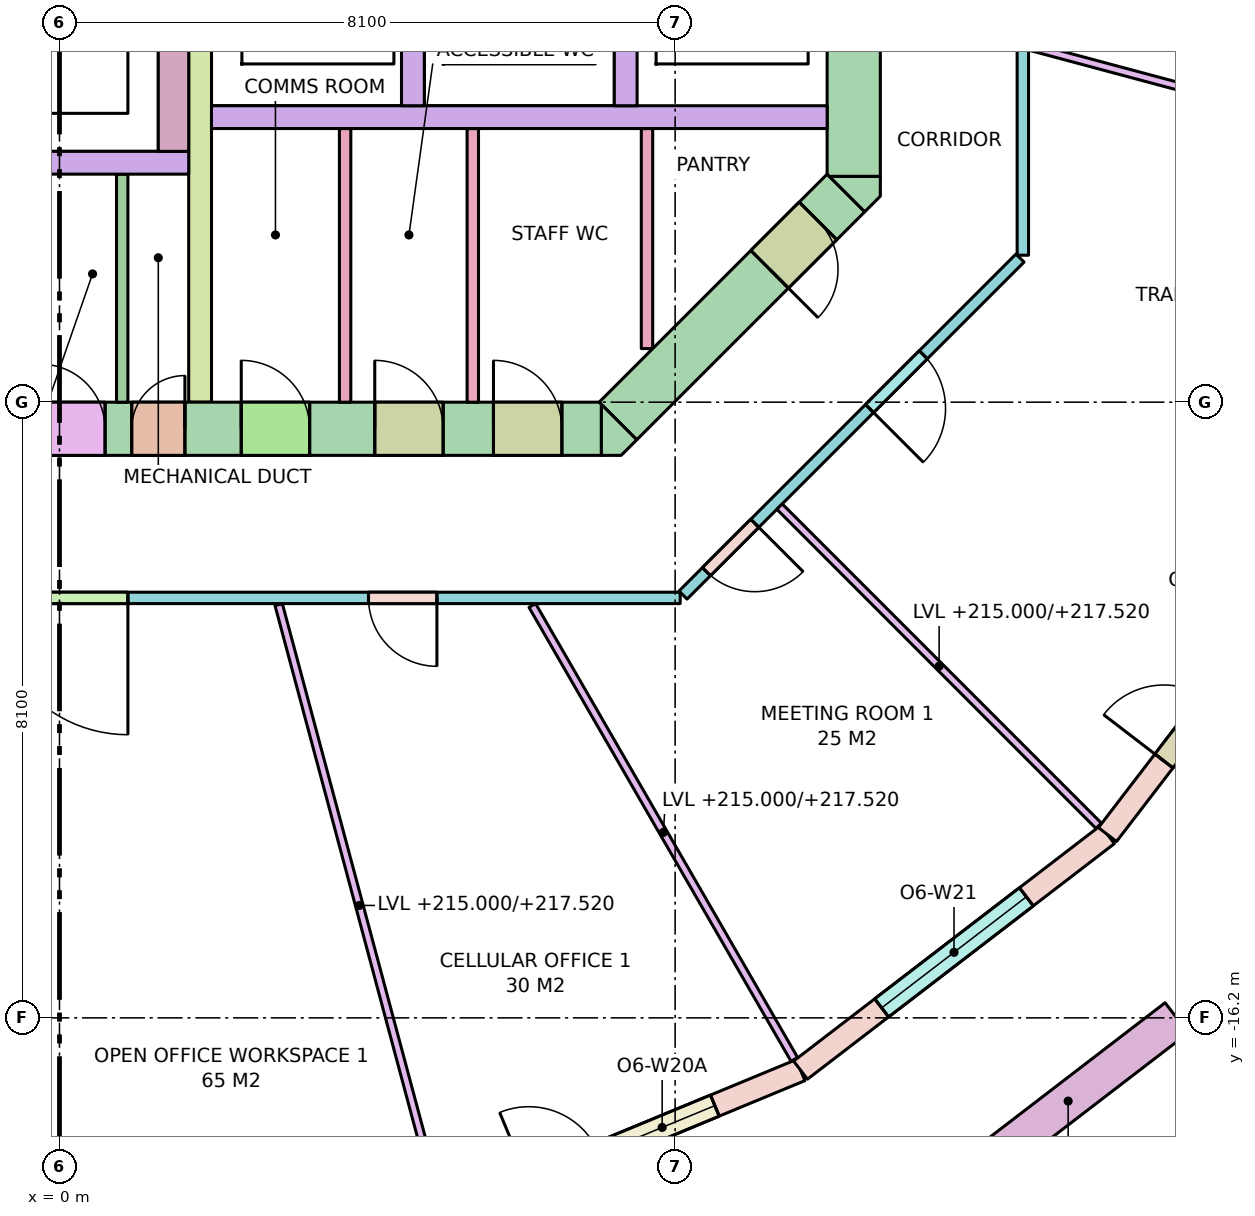
"""IFC4 building model, lengths in metres.
Left out: names, types, materials, properties, quantities, classifications, styles, units other than length and angle.
Written with IfcOpenShell. Run it as: python <this file> out.ifc"""

import sys

from ifc_helpers import new_model, si_unit, direction, frame, frame_2d, origin, place, context, subcontext, project, spatial, polyline, rectangle, outline, extrude, element, fill, save


model = new_model("IFC4")
c1 = context("Model", 3, precision=1e-05, world=origin(), true_north=direction((0.0, 1.0)))
c2 = subcontext(c1, "Body", "Model", "MODEL_VIEW")
j1 = project(units=[si_unit("LENGTHUNIT", "METRE"), si_unit("PLANEANGLEUNIT", "RADIAN")], contexts=[c1])
p1 = place(None, origin())
s1 = spatial("IfcSite", under=j1, at=p1, CompositionType="ELEMENT")
p2 = place(p1, origin())
s2 = spatial("IfcBuilding", under=s1, at=p2, CompositionType="ELEMENT")
p3 = place(p2, frame((0.0, 0.0, 215.0)))
s3 = spatial("IfcBuildingStorey", under=s2, at=p3, CompositionType="ELEMENT", Elevation=215.0)
p4 = place(p3, frame((-7.13, -8.45, -0.28), z_axis=(0.0, 0.0, 1.0), x_axis=(1.0, 0.0, 0.0)))
e1 = element("IfcWall", 1, at=p4, inside=s3, PredefinedType="SHEAR", context=c2, shape_type="SweptSolid", body=[
    extrude(rectangle(XDim=14.26, YDim=0.7, at=frame_2d((7.13, 0.0))), origin(), (0.0, 0.0, 1.0), 3.7),
])
p5 = place(p4, frame((8.08, 0.0, 0.28)))
e2 = element("IfcOpeningElement", 2, at=p5, cuts=e1, PredefinedType="OPENING", context=c2, shape_type="SweptSolid", body=[
    extrude(rectangle(XDim=0.7, YDim=2.1, at=frame_2d((0.35, 1.05))), frame((0.0, 0.36, 0.0), z_axis=(0.0, -1.0, 0.0), x_axis=(1.0, 0.0, 0.0)), (0.0, 0.0, 1.0), 0.72),
])
p6 = place(p4, frame((5.58, 0.0, 0.28)))
e3 = element("IfcOpeningElement", 3, at=p6, cuts=e1, PredefinedType="OPENING", context=c2, shape_type="SweptSolid", body=[
    extrude(rectangle(XDim=0.85, YDim=2.1, at=frame_2d((0.425, 1.05))), frame((0.0, 0.36, 0.0), z_axis=(0.0, -1.0, 0.0), x_axis=(1.0, 0.0, 0.0)), (0.0, 0.0, 1.0), 0.72),
])
p7 = place(p4, frame((6.88, 0.0, 0.28)))
e4 = element("IfcOpeningElement", 4, at=p7, cuts=e1, PredefinedType="OPENING", context=c2, shape_type="SweptSolid", body=[
    extrude(rectangle(XDim=0.85, YDim=2.1, at=frame_2d((0.425, 1.05))), frame((0.0, 0.36, 0.0), z_axis=(0.0, -1.0, 0.0), x_axis=(1.0, 0.0, 0.0)), (0.0, 0.0, 1.0), 0.72),
])
p8 = place(p4, frame((9.521, 0.0, 0.28)))
e5 = element("IfcOpeningElement", 5, at=p8, cuts=e1, PredefinedType="OPENING", context=c2, shape_type="SweptSolid", body=[
    extrude(rectangle(XDim=0.9, YDim=2.1, at=frame_2d((0.45, 1.05))), frame((0.0, 0.36, 0.0), z_axis=(0.0, -1.0, 0.0), x_axis=(1.0, 0.0, 0.0)), (0.0, 0.0, 1.0), 0.72),
])
p9 = place(p4, frame((11.278, 0.0, 0.28)))
e6 = element("IfcOpeningElement", 6, at=p9, cuts=e1, PredefinedType="OPENING", context=c2, shape_type="SweptSolid", body=[
    extrude(rectangle(XDim=0.9, YDim=2.1, at=frame_2d((0.45, 1.05))), frame((0.0, 0.36, 0.0), z_axis=(0.0, -1.0, 0.0), x_axis=(1.0, 0.0, 0.0)), (0.0, 0.0, 1.0), 0.72),
])
p10 = place(p4, frame((12.84, 0.0, 0.28)))
e7 = element("IfcOpeningElement", 7, at=p10, cuts=e1, PredefinedType="OPENING", context=c2, shape_type="SweptSolid", body=[
    extrude(rectangle(XDim=0.9, YDim=2.1, at=frame_2d((0.45, 1.05))), frame((0.0, 0.36, 0.0), z_axis=(0.0, -1.0, 0.0), x_axis=(1.0, 0.0, 0.0)), (0.0, 0.0, 1.0), 0.72),
])
p11 = place(p3, frame((10.45, -5.13, -0.28), z_axis=(0.0, 0.0, 1.0), x_axis=(0.0, 1.0, 0.0)))
e8 = element("IfcWall", 8, at=p11, inside=s3, PredefinedType="SHEAR", context=c2, shape_type="SweptSolid", body=[
    extrude(rectangle(XDim=10.26, YDim=0.7, at=frame_2d((5.13, 0.0))), origin(), (0.0, 0.0, 1.0), 3.7),
])
p12 = place(p11, frame((4.13, 0.0, 0.28)))
e9 = element("IfcOpeningElement", 9, at=p12, cuts=e8, PredefinedType="OPENING", context=c2, shape_type="SweptSolid", body=[
    extrude(rectangle(XDim=2.0, YDim=2.1, at=frame_2d((1.0, 1.05))), frame((0.0, 0.36, 0.0), z_axis=(0.0, -1.0, 0.0), x_axis=(1.0, 0.0, 0.0)), (0.0, 0.0, 1.0), 0.72),
])
p13 = place(p3, frame((10.347, -5.347, -0.28), z_axis=(0.0, 0.0, 1.0), x_axis=(-0.707106781187, -0.707106781187, 0.0)))
e10 = element("IfcWall", 10, at=p13, inside=s3, PredefinedType="SHEAR", context=c2, shape_type="SweptSolid", body=[
    extrude(rectangle(XDim=4.243, YDim=0.7, at=frame_2d((2.121, 0.0))), origin(), (0.0, 0.0, 1.0), 3.7),
])
p14 = place(p13, frame((0.52, 0.0, 0.28)))
e11 = element("IfcOpeningElement", 11, at=p14, cuts=e10, PredefinedType="OPENING", context=c2, shape_type="SweptSolid", body=[
    extrude(rectangle(XDim=0.9, YDim=2.1, at=frame_2d((0.45, 1.05))), frame((0.0, 0.36, 0.0), z_axis=(0.0, -1.0, 0.0), x_axis=(1.0, 0.0, 0.0)), (0.0, 0.0, 1.0), 0.72),
])
p15 = place(p3, frame((0.0, 0.0, -0.28)))
e12 = element("IfcWall", 12, at=p15, inside=s3, PredefinedType="SHEAR", context=c2, shape_type="SweptSolid", body=[
    extrude(outline(polyline([(7.39, -8.8), (7.13, -8.8), (7.13, -8.8), (7.13, -8.13), (7.595, -8.595), (7.595, -8.595), (7.595, -8.595), (7.39, -8.8)])), origin(), (0.0, 0.0, 1.0), 3.7),
])
p16 = place(p3, frame((0.0, 0.0, -0.28)))
e13 = element("IfcWall", 13, at=p16, inside=s3, PredefinedType="SHEAR", context=c2, shape_type="SweptSolid", body=[
    extrude(outline(polyline([(10.8, -5.39), (10.595, -5.595), (10.595, -5.595), (10.595, -5.595), (10.13, -5.13), (10.8, -5.13), (10.8, -5.13), (10.8, -5.39)])), origin(), (0.0, 0.0, 1.0), 3.7),
])
p17 = place(p3, frame((2.0, -4.35, 0.0), z_axis=(0.0, 0.0, 1.0), x_axis=(1.0, 0.0, 0.0)))
e14 = element("IfcWall", 14, at=p17, inside=s3, PredefinedType="SOLIDWALL", context=c2, shape_type="SweptSolid", body=[
    extrude(rectangle(XDim=8.1, YDim=0.3, at=frame_2d((4.05, 0.0))), origin(), (0.0, 0.0, 1.0), 3.42),
])
for number, where, z_axis, x_axis in (
    (15, (4.65, -4.2, 0.0), (0.0, 0.0, 1.0), (0.0, 1.0, 0.0)),
    (16, (7.45, -4.2, 0.0), (0.0, 0.0, 1.0), (0.0, 1.0, 0.0)),
):
    element("IfcWall", number, at=place(p3, frame(where, z_axis=z_axis, x_axis=x_axis)), inside=s3, PredefinedType="SOLIDWALL", context=c2, shape_type="SweptSolid", body=[
        extrude(rectangle(XDim=2.4, YDim=0.3, at=frame_2d((1.2, 0.0))), origin(), (0.0, 0.0, 1.0), 3.42),
    ])
p18 = place(p3, frame((1.85, -8.1, 0.0), z_axis=(0.0, 0.0, 1.0), x_axis=(0.0, 1.0, 0.0)))
e17 = element("IfcWall", 17, at=p18, inside=s3, PredefinedType="SHEAR", context=c2, shape_type="SweptSolid", body=[
    extrude(rectangle(XDim=6.6, YDim=0.3, at=frame_2d((3.3, 0.0))), origin(), (0.0, 0.0, 1.0), 3.42),
])
p19 = place(p3, frame((1.5, -4.8, 0.0), z_axis=(0.0, 0.0, 1.0), x_axis=(0.0, 1.0, 0.0)))
e18 = element("IfcWall", 18, at=p19, inside=s3, PredefinedType="SOLIDWALL", context=c2, shape_type="SweptSolid", body=[
    extrude(rectangle(XDim=3.0, YDim=0.4, at=frame_2d((1.5, 0.0))), origin(), (0.0, 0.0, 1.0), 3.42),
])
p20 = place(p3, frame((-1.7, -4.95, 0.0), z_axis=(0.0, 0.0, 1.0), x_axis=(1.0, 0.0, 0.0)))
e19 = element("IfcWall", 19, at=p20, inside=s3, PredefinedType="SOLIDWALL", context=c2, shape_type="SweptSolid", body=[
    extrude(rectangle(XDim=3.4, YDim=0.3, at=frame_2d((1.7, 0.0))), origin(), (0.0, 0.0, 1.0), 3.42),
])
p21 = place(p3, frame((5.047, -18.836, 0.0), z_axis=(0.0, 0.0, 1.0), x_axis=(0.923862504675, 0.382724538613, 0.0)))
e20 = element("IfcWall", 20, at=p21, inside=s3, PredefinedType="STANDARD", context=c2, shape_type="SweptSolid", body=[
    extrude(rectangle(XDim=5.091, YDim=0.3, at=frame_2d((2.545, 0.0))), origin(), (0.0, 0.0, 1.0), 3.42),
])
p22 = place(p21, frame((1.22, 0.0, 0.0)))
e21 = element("IfcOpeningElement", 21, at=p22, cuts=e20, PredefinedType="OPENING", context=c2, shape_type="SweptSolid", body=[
    extrude(rectangle(XDim=1.0, YDim=2.4, at=frame_2d((0.5, 1.2))), frame((0.0, 0.16, 0.0), z_axis=(0.0, -1.0, 0.0), x_axis=(1.0, 0.0, 0.0)), (0.0, 0.0, 1.0), 0.32),
])
p23 = place(p21, frame((2.37, 0.0, 0.8)))
e22 = element("IfcOpeningElement", 22, at=p23, cuts=e20, PredefinedType="OPENING", context=c2, shape_type="SweptSolid", body=[
    extrude(rectangle(XDim=1.5, YDim=2.4, at=frame_2d((0.75, 1.2))), frame((0.0, 0.16, 0.0), z_axis=(0.0, -1.0, 0.0), x_axis=(1.0, 0.0, 0.0)), (0.0, 0.0, 1.0), 0.32),
])
p24 = place(p3, frame((9.75, -16.887, 0.0), z_axis=(0.0, 0.0, 1.0), x_axis=(0.79335619014, 0.608757714995, 0.0)))
e23 = element("IfcWall", 23, at=p24, inside=s3, PredefinedType="STANDARD", context=c2, shape_type="SweptSolid", body=[
    extrude(rectangle(XDim=5.091, YDim=0.3, at=frame_2d((2.545, 0.0))), origin(), (0.0, 0.0, 1.0), 3.42),
])
p25 = place(p24, frame((1.345, 0.0, 0.8)))
e24 = element("IfcOpeningElement", 24, at=p25, cuts=e23, PredefinedType="OPENING", context=c2, shape_type="SweptSolid", body=[
    extrude(rectangle(XDim=2.4, YDim=2.4, at=frame_2d((1.2, 1.2))), frame((0.0, 0.16, 0.0), z_axis=(0.0, -1.0, 0.0), x_axis=(1.0, 0.0, 0.0)), (0.0, 0.0, 1.0), 0.32),
])
p26 = place(p3, frame((13.789, -13.789, 0.0), z_axis=(0.0, 0.0, 1.0), x_axis=(0.608757714995, 0.79335619014, 0.0)))
e25 = element("IfcWall", 25, at=p26, inside=s3, PredefinedType="STANDARD", context=c2, shape_type="SweptSolid", body=[
    extrude(rectangle(XDim=5.091, YDim=0.3, at=frame_2d((2.545, 0.0))), origin(), (0.0, 0.0, 1.0), 3.42),
])
p27 = place(p26, frame((1.22, 0.0, 0.0)))
e26 = element("IfcOpeningElement", 26, at=p27, cuts=e25, PredefinedType="OPENING", context=c2, shape_type="SweptSolid", body=[
    extrude(rectangle(XDim=1.0, YDim=2.4, at=frame_2d((0.5, 1.2))), frame((0.0, 0.16, 0.0), z_axis=(0.0, -1.0, 0.0), x_axis=(1.0, 0.0, 0.0)), (0.0, 0.0, 1.0), 0.32),
])
p28 = place(p26, frame((2.37, 0.0, 0.8)))
e27 = element("IfcOpeningElement", 27, at=p28, cuts=e25, PredefinedType="OPENING", context=c2, shape_type="SweptSolid", body=[
    extrude(rectangle(XDim=1.5, YDim=2.4, at=frame_2d((0.75, 1.2))), frame((0.0, 0.16, 0.0), z_axis=(0.0, -1.0, 0.0), x_axis=(1.0, 0.0, 0.0)), (0.0, 0.0, 1.0), 0.32),
])
p29 = place(p3, frame((11.843, -18.391, 0.0), z_axis=(0.0, 0.0, 1.0), x_axis=(0.793326845617, 0.608795955984, 0.0)))
e28 = element("IfcWall", 28, at=p29, inside=s3, PredefinedType="PARAPET", context=c2, shape_type="SweptSolid", body=[
    extrude(rectangle(XDim=3.6, YDim=0.5, at=frame_2d((1.8, 0.0))), origin(), (0.0, 0.0, 1.0), 0.9),
])
p30 = place(p3, frame((0.825, -8.1, 0.0), z_axis=(0.0, 0.0, 1.0), x_axis=(0.0, 1.0, 0.0)))
e29 = element("IfcWall", 29, at=p30, inside=s3, PredefinedType="PARTITIONING", context=c2, shape_type="SweptSolid", body=[
    extrude(rectangle(XDim=3.0, YDim=0.15, at=frame_2d((1.5, 0.0))), origin(), (0.0, 0.0, 1.0), 3.42),
])
for number, where, z_axis, x_axis in (
    (30, (3.758, -8.1, 0.0), (0.0, 0.0, 1.0), (0.0, 1.0, 0.0)),
    (31, (5.438, -8.1, 0.0), (0.0, 0.0, 1.0), (0.0, 1.0, 0.0)),
):
    element("IfcWall", number, at=place(p3, frame(where, z_axis=z_axis, x_axis=x_axis)), inside=s3, PredefinedType="PARTITIONING", context=c2, shape_type="SweptSolid", body=[
        extrude(rectangle(XDim=3.6, YDim=0.15, at=frame_2d((1.8, 0.0))), origin(), (0.0, 0.0, 1.0), 3.42),
    ])
p31 = place(p3, frame((7.73, -7.395, 0.0), z_axis=(0.0, 0.0, 1.0), x_axis=(0.0, 1.0, 0.0)))
e32 = element("IfcWall", 32, at=p31, inside=s3, PredefinedType="PARTITIONING", context=c2, shape_type="SweptSolid", body=[
    extrude(rectangle(XDim=2.895, YDim=0.15, at=frame_2d((1.448, 0.0))), origin(), (0.0, 0.0, 1.0), 3.42),
])
p32 = place(p3, frame((12.638, -6.204, 0.0), z_axis=(0.0, 0.0, 1.0), x_axis=(-0.707106781187, -0.707106781187, 0.0)))
e33 = element("IfcWall", 33, at=p32, inside=s3, PredefinedType="PARTITIONING", context=c2, shape_type="SweptSolid", body=[
    extrude(rectangle(XDim=6.271, YDim=0.15, at=frame_2d((3.135, 0.0))), origin(), (0.0, 0.0, 1.0), 2.52),
])
p33 = place(p32, frame((4.935, 0.0, 0.0)))
e34 = element("IfcOpeningElement", 34, at=p33, cuts=e33, PredefinedType="OPENING", context=c2, shape_type="SweptSolid", body=[
    extrude(rectangle(XDim=0.9, YDim=2.1, at=frame_2d((0.45, 1.05))), frame((0.0, 0.085, 0.0), z_axis=(0.0, -1.0, 0.0), x_axis=(1.0, 0.0, 0.0)), (0.0, 0.0, 1.0), 0.17),
])
p34 = place(p32, frame((1.8, 0.0, 0.0)))
e35 = element("IfcOpeningElement", 35, at=p34, cuts=e33, PredefinedType="OPENING", context=c2, shape_type="SweptSolid", body=[
    extrude(rectangle(XDim=1.0, YDim=2.1, at=frame_2d((0.5, 1.05))), frame((0.0, 0.085, 0.0), z_axis=(0.0, -1.0, 0.0), x_axis=(1.0, 0.0, 0.0)), (0.0, 0.0, 1.0), 0.17),
])
p35 = place(p3, frame((8.167, -10.675, 0.0), z_axis=(0.0, 0.0, 1.0), x_axis=(-1.0, 0.0, 0.0)))
e36 = element("IfcWall", 36, at=p35, inside=s3, PredefinedType="PARTITIONING", context=c2, shape_type="SweptSolid", body=[
    extrude(rectangle(XDim=14.33, YDim=0.15, at=frame_2d((7.165, 0.0))), origin(), (0.0, 0.0, 1.0), 2.52),
])
p36 = place(p35, frame((7.267, 0.0, 0.0)))
e37 = element("IfcOpeningElement", 37, at=p36, cuts=e36, PredefinedType="OPENING", context=c2, shape_type="SweptSolid", body=[
    extrude(rectangle(XDim=1.8, YDim=2.1, at=frame_2d((0.9, 1.05))), frame((0.0, 0.085, 0.0), z_axis=(0.0, -1.0, 0.0), x_axis=(1.0, 0.0, 0.0)), (0.0, 0.0, 1.0), 0.17),
])
p37 = place(p35, frame((3.201, 0.0, 0.0)))
e38 = element("IfcOpeningElement", 38, at=p37, cuts=e36, PredefinedType="OPENING", context=c2, shape_type="SweptSolid", body=[
    extrude(rectangle(XDim=0.9, YDim=2.1, at=frame_2d((0.45, 1.05))), frame((0.0, 0.085, 0.0), z_axis=(0.0, -1.0, 0.0), x_axis=(1.0, 0.0, 0.0)), (0.0, 0.0, 1.0), 0.17),
])
p38 = place(p35, frame((11.753, 0.0, 0.0)))
e39 = element("IfcOpeningElement", 39, at=p38, cuts=e36, PredefinedType="OPENING", context=c2, shape_type="SweptSolid", body=[
    extrude(rectangle(XDim=1.8, YDim=2.1, at=frame_2d((0.9, 1.05))), frame((0.0, 0.085, 0.0), z_axis=(0.0, -1.0, 0.0), x_axis=(1.0, 0.0, 0.0)), (0.0, 0.0, 1.0), 0.17),
])
p39 = place(p3, frame((12.675, 6.167, 0.0), z_axis=(0.0, 0.0, 1.0), x_axis=(0.0, -1.0, 0.0)))
e40 = element("IfcWall", 40, at=p39, inside=s3, PredefinedType="PARTITIONING", context=c2, shape_type="SweptSolid", body=[
    extrude(rectangle(XDim=12.333, YDim=0.15, at=frame_2d((6.167, 0.0))), origin(), (0.0, 0.0, 1.0), 2.52),
])
p40 = place(p39, frame((7.416, 0.0, 0.0)))
e41 = element("IfcOpeningElement", 41, at=p40, cuts=e40, PredefinedType="OPENING", context=c2, shape_type="SweptSolid", body=[
    extrude(rectangle(XDim=0.9, YDim=2.1, at=frame_2d((0.45, 1.05))), frame((0.0, 0.085, 0.0), z_axis=(0.0, -1.0, 0.0), x_axis=(1.0, 0.0, 0.0)), (0.0, 0.0, 1.0), 0.17),
])
p41 = place(p3, frame((2.884, -10.764, 0.0), z_axis=(0.0, 0.0, 1.0), x_axis=(0.258818011497, -0.965926103242, 0.0)))
e42 = element("IfcWall", 42, at=p41, inside=s3, PredefinedType="PARTITIONING", context=c2, shape_type="SweptSolid", body=[
    extrude(rectangle(XDim=8.192, YDim=0.1, at=frame_2d((4.096, 0.0))), origin(), (0.0, 0.0, 1.0), 2.52),
])
p42 = place(p3, frame((6.221, -10.775, 0.0), z_axis=(0.0, 0.0, 1.0), x_axis=(0.500015661236, -0.866016361577, 0.0)))
e43 = element("IfcWall", 43, at=p42, inside=s3, PredefinedType="PARTITIONING", context=c2, shape_type="SweptSolid", body=[
    extrude(rectangle(XDim=6.895, YDim=0.1, at=frame_2d((3.448, 0.0))), origin(), (0.0, 0.0, 1.0), 2.52),
])
p43 = place(p3, frame((9.474, -9.474, 0.0), z_axis=(0.0, 0.0, 1.0), x_axis=(0.707106781187, -0.707106781187, 0.0)))
e44 = element("IfcWall", 44, at=p43, inside=s3, PredefinedType="PARTITIONING", context=c2, shape_type="SweptSolid", body=[
    extrude(rectangle(XDim=5.938, YDim=0.1, at=frame_2d((2.969, 0.0))), origin(), (0.0, 0.0, 1.0), 2.52),
])
p44 = place(p3, frame((12.764, -3.42, 0.0), z_axis=(0.0, 0.0, 1.0), x_axis=(0.965925800266, -0.258819142221, 0.0)))
e45 = element("IfcWall", 45, at=p44, inside=s3, PredefinedType="PARTITIONING", context=c2, shape_type="SweptSolid", body=[
    extrude(rectangle(XDim=6.122, YDim=0.1, at=frame_2d((3.061, 0.0))), origin(), (0.0, 0.0, 1.0), 2.52),
])
p45 = place(p23, origin())
e46 = element("IfcWindow", 46, at=p45, inside=s3, PartitioningType="SINGLE_PANEL", PredefinedType="WINDOW", context=c2, shape_type="SweptSolid", body=[
    extrude(rectangle(XDim=1.5, YDim=2.4, at=frame_2d((0.75, 1.2))), frame((0.0, 0.03, 0.0), z_axis=(0.0, -1.0, 0.0), x_axis=(1.0, 0.0, 0.0)), (0.0, 0.0, 1.0), 0.06),
])
fill(e22, e46)
p46 = place(p25, origin())
e47 = element("IfcWindow", 47, at=p46, inside=s3, PartitioningType="SINGLE_PANEL", PredefinedType="WINDOW", context=c2, shape_type="SweptSolid", body=[
    extrude(rectangle(XDim=2.4, YDim=2.4, at=frame_2d((1.2, 1.2))), frame((0.0, 0.03, 0.0), z_axis=(0.0, -1.0, 0.0), x_axis=(1.0, 0.0, 0.0)), (0.0, 0.0, 1.0), 0.06),
])
fill(e24, e47)
p47 = place(p27, origin())
e48 = element("IfcDoor", 48, at=p47, inside=s3, OperationType="SINGLE_SWING_LEFT", PredefinedType="DOOR", context=c2, shape_type="SweptSolid", body=[
    extrude(rectangle(XDim=1.0, YDim=2.4, at=frame_2d((0.5, 1.2))), frame((0.0, 0.025, 0.0), z_axis=(0.0, -1.0, 0.0), x_axis=(1.0, 0.0, 0.0)), (0.0, 0.0, 1.0), 0.05),
])
fill(e26, e48)
p48 = place(p5, origin())
e49 = element("IfcDoor", 49, at=p48, inside=s3, OperationType="SINGLE_SWING_RIGHT", PredefinedType="DOOR", context=c2, shape_type="SweptSolid", body=[
    extrude(rectangle(XDim=0.7, YDim=2.1, at=frame_2d((0.35, 1.05))), frame((0.0, 0.025, 0.0), z_axis=(0.0, -1.0, 0.0), x_axis=(1.0, 0.0, 0.0)), (0.0, 0.0, 1.0), 0.05),
])
fill(e2, e49)
p49 = place(p7, origin())
e50 = element("IfcDoor", 50, at=p49, inside=s3, OperationType="SINGLE_SWING_LEFT", PredefinedType="DOOR", context=c2, shape_type="SweptSolid", body=[
    extrude(rectangle(XDim=0.85, YDim=2.1, at=frame_2d((0.425, 1.05))), frame((0.0, 0.025, 0.0), z_axis=(0.0, -1.0, 0.0), x_axis=(1.0, 0.0, 0.0)), (0.0, 0.0, 1.0), 0.05),
])
fill(e4, e50)
p50 = place(p8, origin())
e51 = element("IfcDoor", 51, at=p50, inside=s3, OperationType="SINGLE_SWING_LEFT", PredefinedType="DOOR", context=c2, shape_type="SweptSolid", body=[
    extrude(rectangle(XDim=0.9, YDim=2.1, at=frame_2d((0.45, 1.05))), frame((0.0, 0.025, 0.0), z_axis=(0.0, -1.0, 0.0), x_axis=(1.0, 0.0, 0.0)), (0.0, 0.0, 1.0), 0.05),
])
fill(e5, e51)
p51 = place(p9, origin())
e52 = element("IfcDoor", 52, at=p51, inside=s3, OperationType="SINGLE_SWING_LEFT", PredefinedType="DOOR", context=c2, shape_type="SweptSolid", body=[
    extrude(rectangle(XDim=0.9, YDim=2.1, at=frame_2d((0.45, 1.05))), frame((0.0, 0.025, 0.0), z_axis=(0.0, -1.0, 0.0), x_axis=(1.0, 0.0, 0.0)), (0.0, 0.0, 1.0), 0.05),
])
fill(e6, e52)
p52 = place(p10, origin())
e53 = element("IfcDoor", 53, at=p52, inside=s3, OperationType="SINGLE_SWING_LEFT", PredefinedType="DOOR", context=c2, shape_type="SweptSolid", body=[
    extrude(rectangle(XDim=0.9, YDim=2.1, at=frame_2d((0.45, 1.05))), frame((0.0, 0.025, 0.0), z_axis=(0.0, -1.0, 0.0), x_axis=(1.0, 0.0, 0.0)), (0.0, 0.0, 1.0), 0.05),
])
fill(e7, e53)
p53 = place(p14, origin())
e54 = element("IfcDoor", 54, at=p53, inside=s3, OperationType="SINGLE_SWING_RIGHT", PredefinedType="DOOR", context=c2, shape_type="SweptSolid", body=[
    extrude(rectangle(XDim=0.9, YDim=2.1, at=frame_2d((0.45, 1.05))), frame((0.0, 0.025, 0.0), z_axis=(0.0, -1.0, 0.0), x_axis=(1.0, 0.0, 0.0)), (0.0, 0.0, 1.0), 0.05),
])
fill(e11, e54)
p54 = place(p36, origin())
e55 = element("IfcDoor", 55, at=p54, inside=s3, OperationType="DOUBLE_DOOR_SINGLE_SWING", PredefinedType="DOOR", context=c2, shape_type="SweptSolid", body=[
    extrude(rectangle(XDim=1.8, YDim=2.1, at=frame_2d((0.9, 1.05))), frame((0.0, 0.025, 0.0), z_axis=(0.0, -1.0, 0.0), x_axis=(1.0, 0.0, 0.0)), (0.0, 0.0, 1.0), 0.05),
])
fill(e37, e55)
p55 = place(p37, origin())
e56 = element("IfcDoor", 56, at=p55, inside=s3, OperationType="SINGLE_SWING_LEFT", PredefinedType="DOOR", context=c2, shape_type="SweptSolid", body=[
    extrude(rectangle(XDim=0.9, YDim=2.1, at=frame_2d((0.45, 1.05))), frame((0.0, 0.025, 0.0), z_axis=(0.0, -1.0, 0.0), x_axis=(1.0, 0.0, 0.0)), (0.0, 0.0, 1.0), 0.05),
])
fill(e38, e56)
p56 = place(p33, origin())
e57 = element("IfcDoor", 57, at=p56, inside=s3, OperationType="SINGLE_SWING_LEFT", PredefinedType="DOOR", context=c2, shape_type="SweptSolid", body=[
    extrude(rectangle(XDim=0.9, YDim=2.1, at=frame_2d((0.45, 1.05))), frame((0.0, 0.025, 0.0), z_axis=(0.0, -1.0, 0.0), x_axis=(1.0, 0.0, 0.0)), (0.0, 0.0, 1.0), 0.05),
])
fill(e34, e57)
p57 = place(p34, origin())
e58 = element("IfcDoor", 58, at=p57, inside=s3, OperationType="SINGLE_SWING_RIGHT", PredefinedType="DOOR", context=c2, shape_type="SweptSolid", body=[
    extrude(rectangle(XDim=1.0, YDim=2.1, at=frame_2d((0.5, 1.05))), frame((0.0, 0.025, 0.0), z_axis=(0.0, -1.0, 0.0), x_axis=(1.0, 0.0, 0.0)), (0.0, 0.0, 1.0), 0.05),
])
fill(e35, e58)
save(model, sys.argv[1])
